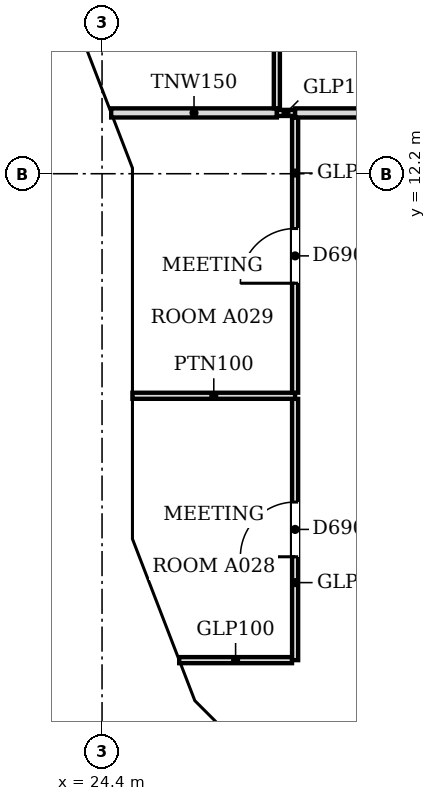
"""IFC4 building model, lengths in metres.
Left out: names, types, materials, properties, quantities, classifications, styles, units other than length and angle.
Written with IfcOpenShell. Run it as: python <this file> out.ifc"""

import sys

from ifc_helpers import new_model, si_unit, direction, frame, frame_2d, origin, place, context, subcontext, project, spatial, polyline, rectangle, outline, extrude, faceted_brep, source, transform, mapped, element, fill, save


model = new_model("IFC4")
c1 = context("Model", 3, precision=1e-05, world=origin(), true_north=direction((0.0, 1.0)))
c2 = subcontext(c1, "Body", "Model", "MODEL_VIEW")
j1 = project(units=[si_unit("LENGTHUNIT", "METRE"), si_unit("PLANEANGLEUNIT", "RADIAN")], contexts=[c1])
p1 = place(None, origin())
s1 = spatial("IfcSite", under=j1, at=p1, CompositionType="ELEMENT")
p2 = place(p1, origin())
s2 = spatial("IfcBuilding", under=s1, at=p2, CompositionType="ELEMENT")
p3 = place(p2, frame((0.0, 0.0, 95.2)))
s3 = spatial("IfcBuildingStorey", under=s2, at=p3, CompositionType="ELEMENT", Elevation=95.2)
m1 = source(origin(), c2, "Body", "Brep", [
    faceted_brep([(3.103, -0.25, 7.544), (0.053, -0.25, 3.864), (0.053, -0.25, 3.736), (3.103, -0.25, 0.056), (0.0, 0.25, 3.8), (3.149, 0.25, 7.6), (3.196, 0.25, 7.543), (3.196, 0.25, 0.057), (3.149, 0.25, 0.0), (3.149, -0.0, 0.0), (3.149, -0.0, 7.6), (0.0, 0.0, 3.8)], [[[0, 1, 2, 3]], [[4, 5, 6, 7, 8]], [[8, 7, 9]], [[6, 5, 10]], [[5, 4, 11, 1, 0, 10]], [[4, 8, 9, 3, 2, 11]], [[11, 2, 1]], [[3, 9, 7, 6, 10, 0]]]),
])
p4 = place(p3, frame((23.517, 15.185, -3.8), z_axis=(0.0, 0.0, 1.0), x_axis=(0.359864468756, -0.933004589553, 0.0)))
e1 = element("IfcWall", 1, at=p4, inside=s3, PredefinedType="SOLIDWALL", context=c2, shape_type="MappedRepresentation", body=[
    mapped(m1, transform((0.0, 0.0, 0.0), scale=1.0)),
])
m2 = source(origin(), c2, "Body", "SweptSolid", [
    extrude(outline(polyline([(2.949, 6.967), (0.325, 3.8), (2.949, 0.633), (2.949, 6.967)])), frame((0.0, 0.26, 0.0), z_axis=(0.0, -1.0, 0.0), x_axis=(1.0, 0.0, 0.0)), (0.0, 0.0, 1.0), 0.52),
])
p5 = place(p4, origin())
e2 = element("IfcOpeningElement", 2, at=p5, cuts=e1, PredefinedType="OPENING", context=c2, shape_type="MappedRepresentation", body=[
    mapped(m2, transform((0.0, 0.0, 0.0), scale=1.0)),
])
m3 = source(origin(), c2, "Body", "Brep", [
    faceted_brep([(0.093, -0.25, 0.057), (3.143, -0.25, 3.8), (0.093, -0.25, 7.543), (0.0, 0.25, 7.544), (0.047, 0.25, 7.6), (3.143, 0.25, 3.8), (0.047, 0.25, 0.0), (0.0, 0.25, 0.056), (0.047, 0.0, 0.0), (0.047, 0.0, 7.6)], [[[0, 1, 2]], [[3, 4, 5, 6, 7]], [[6, 5, 1, 0, 8]], [[5, 4, 9, 2, 1]], [[4, 3, 9]], [[7, 6, 8]], [[7, 8, 0, 2, 9, 3]]]),
])
p6 = place(p3, frame((24.65, 12.293, -3.8), z_axis=(0.0, 0.0, 1.0), x_axis=(0.0, -1.0, 0.0)))
e3 = element("IfcWall", 3, at=p6, inside=s3, PredefinedType="SOLIDWALL", context=c2, shape_type="MappedRepresentation", body=[
    mapped(m3, transform((0.0, 0.0, 0.0), scale=1.0)),
])
m4 = source(origin(), c2, "Body", "SweptSolid", [
    extrude(outline(polyline([(0.247, 0.641), (2.821, 3.8), (0.247, 6.959), (0.247, 0.641)])), frame((0.0, 0.26, 0.0), z_axis=(0.0, -1.0, 0.0), x_axis=(1.0, 0.0, 0.0)), (0.0, 0.0, 1.0), 0.52),
])
p7 = place(p6, origin())
e4 = element("IfcOpeningElement", 4, at=p7, cuts=e3, PredefinedType="OPENING", context=c2, shape_type="MappedRepresentation", body=[
    mapped(m4, transform((0.0, 0.0, 0.0), scale=1.0)),
])
m5 = source(origin(), c2, "Body", "Brep", [
    faceted_brep([(3.003, -0.25, 0.0), (3.05, -0.25, 0.06), (3.05, -0.25, 7.54), (3.003, -0.25, 7.6), (0.0, -0.25, 3.8), (0.0, 0.25, 3.8), (2.957, 0.25, 7.541), (2.957, 0.25, 0.059), (3.003, 0.0, 0.0), (3.003, 0.0, 7.6)], [[[0, 1, 2, 3, 4]], [[5, 6, 7]], [[1, 0, 8]], [[9, 3, 2]], [[6, 5, 4, 3, 9]], [[5, 7, 8, 0, 4]], [[1, 8, 7, 6, 9, 2]]]),
])
p8 = place(p3, frame((24.65, 9.15, -3.8), z_axis=(0.0, 0.0, 1.0), x_axis=(0.0, -1.0, 0.0)))
e5 = element("IfcWall", 5, at=p8, inside=s3, PredefinedType="SOLIDWALL", context=c2, shape_type="MappedRepresentation", body=[
    mapped(m5, transform((0.0, 0.0, 0.0), scale=1.0)),
])
m6 = source(origin(), c2, "Body", "SweptSolid", [
    extrude(outline(polyline([(2.803, 6.944), (0.319, 3.8), (2.803, 0.656), (2.803, 6.944)])), frame((0.0, 0.26, 0.0), z_axis=(0.0, -1.0, 0.0), x_axis=(1.0, 0.0, 0.0)), (0.0, 0.0, 1.0), 0.52),
])
p9 = place(p8, origin())
e6 = element("IfcOpeningElement", 6, at=p9, cuts=e5, PredefinedType="OPENING", context=c2, shape_type="MappedRepresentation", body=[
    mapped(m6, transform((0.0, 0.0, 0.0), scale=1.0)),
])
m7 = source(origin(), c2, "Body", "Brep", [
    faceted_brep([(0.047, -0.25, 0.0), (2.997, -0.25, 3.8), (0.047, -0.25, 7.6), (0.0, -0.25, 7.541), (0.0, -0.25, 0.059), (0.093, 0.25, 7.54), (2.944, 0.25, 3.868), (2.944, 0.25, 3.732), (0.093, 0.25, 0.06), (2.997, 0.0, 3.8), (0.047, 0.0, 0.0), (0.047, 0.0, 7.6)], [[[0, 1, 2, 3, 4]], [[5, 6, 7, 8]], [[8, 7, 9, 1, 0, 10]], [[6, 5, 11, 2, 1, 9]], [[3, 2, 11]], [[10, 0, 4]], [[8, 10, 4, 3, 11, 5]], [[9, 7, 6]]]),
])
p10 = place(p3, frame((24.633, 6.19, -3.8), z_axis=(0.0, 0.0, 1.0), x_axis=(0.359901446078, -0.932990326376, 0.0)))
e7 = element("IfcWall", 7, at=p10, inside=s3, PredefinedType="SOLIDWALL", context=c2, shape_type="MappedRepresentation", body=[
    mapped(m7, transform((0.0, 0.0, 0.0), scale=1.0)),
])
m8 = source(origin(), c2, "Body", "SweptSolid", [
    extrude(outline(polyline([(0.247, 0.665), (2.681, 3.8), (0.247, 6.935), (0.247, 0.665)])), frame((0.0, 0.26, 0.0), z_axis=(0.0, -1.0, 0.0), x_axis=(1.0, 0.0, 0.0)), (0.0, 0.0, 1.0), 0.52),
])
p11 = place(p10, origin())
e8 = element("IfcOpeningElement", 8, at=p11, cuts=e7, PredefinedType="OPENING", context=c2, shape_type="MappedRepresentation", body=[
    mapped(m8, transform((0.0, 0.0, 0.0), scale=1.0)),
])
m9 = source(origin(), c2, "Body", "Brep", [
    faceted_brep([(2.944, -0.25, 0.0), (2.997, -0.25, 0.068), (2.997, -0.25, 7.532), (2.944, -0.25, 7.6), (0.0, -0.25, 3.8), (0.053, 0.25, 3.868), (2.891, 0.25, 7.532), (2.891, 0.25, 0.068), (0.053, 0.25, 3.732), (2.944, 0.0, 0.0), (2.944, 0.0, 7.6), (0.0, 0.0, 3.8)], [[[0, 1, 2, 3, 4]], [[5, 6, 7, 8]], [[1, 0, 9]], [[10, 3, 2]], [[6, 5, 11, 4, 3, 10]], [[8, 7, 9, 0, 4, 11]], [[8, 11, 5]], [[1, 9, 7, 6, 10, 2]]]),
])
p12 = place(p3, frame((25.712, 3.394, -3.8), z_axis=(0.0, 0.0, 1.0), x_axis=(0.707066050402, -0.707147509625, 0.0)))
e9 = element("IfcWall", 9, at=p12, inside=s3, PredefinedType="SOLIDWALL", context=c2, shape_type="MappedRepresentation", body=[
    mapped(m9, transform((0.0, 0.0, 0.0), scale=1.0)),
])
m10 = source(origin(), c2, "Body", "SweptSolid", [
    extrude(outline(polyline([(2.744, 6.934), (0.316, 3.8), (2.744, 0.667), (2.744, 6.934)])), frame((0.0, 0.26, 0.0), z_axis=(0.0, -1.0, 0.0), x_axis=(1.0, 0.0, 0.0)), (0.0, 0.0, 1.0), 0.52),
])
p13 = place(p12, origin())
e10 = element("IfcOpeningElement", 10, at=p13, cuts=e9, PredefinedType="OPENING", context=c2, shape_type="MappedRepresentation", body=[
    mapped(m10, transform((0.0, 0.0, 0.0), scale=1.0)),
])
p14 = place(p2, frame((0.0, 0.0, 99.0)))
s4 = spatial("IfcBuildingStorey", under=s2, at=p14, CompositionType="ELEMENT", Elevation=99.0)
m11 = source(origin(), c2, "Body", "Brep", [
    faceted_brep([(0.106, -0.25, 0.064), (3.156, -0.25, 3.744), (3.156, -0.25, 3.856), (0.106, -0.25, 7.536), (0.0, 0.25, 7.536), (0.053, 0.25, 7.6), (3.202, 0.25, 3.8), (0.053, 0.25, 0.0), (0.0, 0.25, 0.064), (3.202, -0.0, 3.8), (0.053, 0.0, 0.0), (0.053, 0.0, 7.6)], [[[0, 1, 2, 3]], [[4, 5, 6, 7, 8]], [[7, 6, 9, 1, 0, 10]], [[6, 5, 11, 3, 2, 9]], [[5, 4, 11]], [[8, 7, 10]], [[8, 10, 0, 3, 11, 4]], [[1, 9, 2]]]),
])
p15 = place(p14, frame((23.497, 15.234, -3.8), z_axis=(0.0, 0.0, 1.0), x_axis=(0.359913782069, -0.932985567668, 0.0)))
e11 = element("IfcWall", 11, at=p15, inside=s4, PredefinedType="SOLIDWALL", context=c2, shape_type="MappedRepresentation", body=[
    mapped(m11, transform((0.0, 0.0, 0.0), scale=1.0)),
])
m12 = source(origin(), c2, "Body", "SweptSolid", [
    extrude(outline(polyline([(0.253, 0.633), (2.878, 3.8), (0.253, 6.967), (0.253, 0.633)])), frame((0.0, 0.26, 0.0), z_axis=(0.0, -1.0, 0.0), x_axis=(1.0, 0.0, 0.0)), (0.0, 0.0, 1.0), 0.52),
])
p16 = place(p15, origin())
e12 = element("IfcOpeningElement", 12, at=p16, cuts=e11, PredefinedType="OPENING", context=c2, shape_type="MappedRepresentation", body=[
    mapped(m12, transform((0.0, 0.0, 0.0), scale=1.0)),
])
m13 = source(origin(), c2, "Body", "Brep", [
    faceted_brep([(3.096, -0.25, 0.0), (6.1, -0.25, 3.8), (3.096, -0.25, 7.6), (0.047, -0.25, 3.857), (0.047, -0.25, 3.743), (0.0, 0.25, 3.8), (3.096, 0.25, 7.6), (6.053, 0.25, 3.859), (6.053, 0.25, 3.741), (3.096, 0.25, 0.0), (6.1, -0.0, 3.8), (0.0, 0.0, 3.8)], [[[0, 1, 2, 3, 4]], [[5, 6, 7, 8, 9]], [[9, 8, 10, 1, 0]], [[7, 6, 2, 1, 10]], [[6, 5, 11, 3, 2]], [[5, 9, 0, 4, 11]], [[11, 4, 3]], [[10, 8, 7]]]),
])
p17 = place(p14, frame((24.65, 12.247, -3.8), z_axis=(0.0, 0.0, 1.0), x_axis=(0.0, -1.0, 0.0)))
e13 = element("IfcWall", 13, at=p17, inside=s4, PredefinedType="SOLIDWALL", context=c2, shape_type="MappedRepresentation", body=[
    mapped(m13, transform((0.0, 0.0, 0.0), scale=1.0)),
])
m14 = source(origin(), c2, "Body", "SweptSolid", [
    extrude(outline(polyline([(3.094, 0.399), (5.781, 3.8), (3.094, 7.201), (0.323, 3.8), (3.094, 0.399)])), frame((0.0, 0.26, 0.0), z_axis=(0.0, -1.0, 0.0), x_axis=(1.0, 0.0, 0.0)), (0.0, 0.0, 1.0), 0.52),
])
p18 = place(p17, origin())
e14 = element("IfcOpeningElement", 14, at=p18, cuts=e13, PredefinedType="OPENING", context=c2, shape_type="MappedRepresentation", body=[
    mapped(m14, transform((0.0, 0.0, 0.0), scale=1.0)),
])
m15 = source(origin(), c2, "Body", "Brep", [
    faceted_brep([(2.95, -0.25, 0.0), (3.003, -0.25, 0.068), (3.003, -0.25, 7.532), (2.95, -0.25, 7.6), (0.0, -0.25, 3.8), (0.047, 0.25, 3.86), (2.898, 0.25, 7.532), (2.898, 0.25, 0.068), (0.047, 0.25, 3.74), (2.95, 0.0, 0.0), (2.95, 0.0, 7.6), (0.0, 0.0, 3.8)], [[[0, 1, 2, 3, 4]], [[5, 6, 7, 8]], [[1, 0, 9]], [[10, 3, 2]], [[6, 5, 11, 4, 3, 10]], [[8, 7, 9, 0, 4, 11]], [[8, 11, 5]], [[1, 9, 7, 6, 10, 2]]]),
])
p19 = place(p14, frame((24.65, 6.146, -3.8), z_axis=(0.0, 0.0, 1.0), x_axis=(0.359953949349, -0.932970071518, 0.0)))
e15 = element("IfcWall", 15, at=p19, inside=s4, PredefinedType="SOLIDWALL", context=c2, shape_type="MappedRepresentation", body=[
    mapped(m15, transform((0.0, 0.0, 0.0), scale=1.0)),
])
m16 = source(origin(), c2, "Body", "SweptSolid", [
    extrude(outline(polyline([(2.75, 6.935), (0.316, 3.8), (2.75, 0.665), (2.75, 6.935)])), frame((0.0, 0.26, 0.0), z_axis=(0.0, -1.0, 0.0), x_axis=(1.0, 0.0, 0.0)), (0.0, 0.0, 1.0), 0.52),
])
p20 = place(p19, origin())
e16 = element("IfcOpeningElement", 16, at=p20, cuts=e15, PredefinedType="OPENING", context=c2, shape_type="MappedRepresentation", body=[
    mapped(m16, transform((0.0, 0.0, 0.0), scale=1.0)),
])
m17 = source(origin(), c2, "Body", "Brep", [
    faceted_brep([(0.053, -0.25, 0.0), (2.997, -0.25, 3.8), (0.053, -0.25, 7.6), (0.0, -0.25, 7.532), (0.0, -0.25, 0.068), (0.106, 0.25, 7.532), (2.944, 0.25, 3.868), (2.944, 0.25, 3.732), (0.106, 0.25, 0.068), (2.997, 0.0, 3.8), (0.053, 0.0, 0.0), (0.053, 0.0, 7.6)], [[[0, 1, 2, 3, 4]], [[5, 6, 7, 8]], [[8, 7, 9, 1, 0, 10]], [[6, 5, 11, 2, 1, 9]], [[3, 2, 11]], [[10, 0, 4]], [[8, 10, 4, 3, 11, 5]], [[9, 7, 6]]]),
])
p21 = place(p14, frame((25.675, 3.431, -3.8), z_axis=(0.0, 0.0, 1.0), x_axis=(0.707106781187, -0.707106781187, 0.0)))
e17 = element("IfcWall", 17, at=p21, inside=s4, PredefinedType="SOLIDWALL", context=c2, shape_type="MappedRepresentation", body=[
    mapped(m17, transform((0.0, 0.0, 0.0), scale=1.0)),
])
m18 = source(origin(), c2, "Body", "SweptSolid", [
    extrude(outline(polyline([(0.253, 0.666), (2.681, 3.8), (0.253, 6.934), (0.253, 0.666)])), frame((0.0, 0.26, 0.0), z_axis=(0.0, -1.0, 0.0), x_axis=(1.0, 0.0, 0.0)), (0.0, 0.0, 1.0), 0.52),
])
p22 = place(p21, origin())
e18 = element("IfcOpeningElement", 18, at=p22, cuts=e17, PredefinedType="OPENING", context=c2, shape_type="MappedRepresentation", body=[
    mapped(m18, transform((0.0, 0.0, 0.0), scale=1.0)),
])
p23 = place(p3, frame((25.669, 4.2, 0.0), z_axis=(0.0, 0.0, 1.0), x_axis=(1.0, 0.0, 0.0)))
e19 = element("IfcWall", 19, at=p23, inside=s3, PredefinedType="PARTITIONING", context=c2, shape_type="SweptSolid", body=[
    extrude(rectangle(XDim=1.855, YDim=0.1, at=frame_2d((0.928, 0.0))), origin(), (0.0, 0.0, 1.0), 3.067),
])
p24 = place(p3, frame((27.575, 4.2, 0.0), z_axis=(0.0, 0.0, 1.0), x_axis=(0.0, 1.0, 0.0)))
e20 = element("IfcWall", 20, at=p24, inside=s3, PredefinedType="PARTITIONING", context=c2, shape_type="SweptSolid", body=[
    extrude(rectangle(XDim=4.297, YDim=0.1, at=frame_2d((2.148, 0.0))), origin(), (0.0, 0.0, 1.0), 3.067),
])
m19 = source(origin(), c2, "Body", "SweptSolid", [
    extrude(rectangle(XDim=0.9, YDim=2.1, at=frame_2d((0.45, 1.05))), frame((0.0, 0.06, 0.0), z_axis=(0.0, -1.0, 0.0), x_axis=(1.0, 0.0, 0.0)), (0.0, 0.0, 1.0), 0.12),
])
p25 = place(p24, frame((1.7, 0.0, 0.0)))
e21 = element("IfcOpeningElement", 21, at=p25, cuts=e20, PredefinedType="OPENING", context=c2, shape_type="MappedRepresentation", body=[
    mapped(m19, transform((0.0, 0.0, 0.0), scale=1.0)),
])
p26 = place(p3, frame((24.9, 8.548, 0.0), z_axis=(0.0, 0.0, 1.0), x_axis=(1.0, 0.0, 0.0)))
e22 = element("IfcWall", 22, at=p26, inside=s3, PredefinedType="PARTITIONING", context=c2, shape_type="SweptSolid", body=[
    extrude(rectangle(XDim=2.675, YDim=0.1, at=frame_2d((1.337, 0.0))), origin(), (0.0, 0.0, 1.0), 3.067),
])
p27 = place(p3, frame((27.575, 8.599, 0.0), z_axis=(0.0, 0.0, 1.0), x_axis=(0.0, 1.0, 0.0)))
e23 = element("IfcWall", 23, at=p27, inside=s3, PredefinedType="PARTITIONING", context=c2, shape_type="SweptSolid", body=[
    extrude(rectangle(XDim=4.525, YDim=0.1, at=frame_2d((2.263, 0.0))), origin(), (0.0, 0.0, 1.0), 3.067),
])
p28 = place(p27, frame((1.8, 0.0, 0.0)))
e24 = element("IfcOpeningElement", 24, at=p28, cuts=e23, PredefinedType="OPENING", context=c2, shape_type="MappedRepresentation", body=[
    mapped(m19, transform((0.0, 0.0, 0.0), scale=1.0)),
])
p29 = place(p3, frame((24.55, 13.2, 0.0), z_axis=(0.0, 0.0, 1.0), x_axis=(1.0, 0.0, 0.0)))
e25 = element("IfcWall", 25, at=p29, inside=s3, PredefinedType="PARTITIONING", context=c2, shape_type="SweptSolid", body=[
    extrude(rectangle(XDim=2.725, YDim=0.15, at=frame_2d((1.362, 0.0))), origin(), (0.0, 0.0, 1.0), 3.067),
])
p30 = place(p3, frame((27.276, 13.2, 0.0), z_axis=(0.0, 0.0, 1.0), x_axis=(1.0, 0.0, 0.0)))
e26 = element("IfcWall", 26, at=p30, inside=s3, PredefinedType="PARTITIONING", context=c2, shape_type="SweptSolid", body=[
    extrude(rectangle(XDim=0.298, YDim=0.1, at=frame_2d((0.149, 0.0))), origin(), (0.0, 0.0, 1.0), 3.067),
])
p31 = place(p3, frame((27.575, 13.2, 0.0), z_axis=(0.0, 0.0, 1.0), x_axis=(1.0, 0.0, 0.0)))
e27 = element("IfcWall", 27, at=p31, inside=s3, PredefinedType="PARTITIONING", context=c2, shape_type="SweptSolid", body=[
    extrude(rectangle(XDim=15.349, YDim=0.15, at=frame_2d((7.675, 0.0))), origin(), (0.0, 0.0, 1.0), 3.067),
])
p32 = place(p3, frame((27.275, 13.276, 0.0), z_axis=(0.0, 0.0, 1.0), x_axis=(0.0, 1.0, 0.0)))
e28 = element("IfcWall", 28, at=p32, inside=s3, PredefinedType="PARTITIONING", context=c2, shape_type="SweptSolid", body=[
    extrude(rectangle(XDim=5.448, YDim=0.1, at=frame_2d((2.724, 0.0))), origin(), (0.0, 0.0, 1.0), 3.067),
])
p33 = place(p32, frame((2.3, 0.0, 0.0)))
e29 = element("IfcOpeningElement", 29, at=p33, cuts=e28, PredefinedType="OPENING", context=c2, shape_type="MappedRepresentation", body=[
    mapped(m19, transform((0.0, 0.0, 0.0), scale=1.0)),
])
m20 = source(origin(), c2, "Body", "SweptSolid", [
    extrude(rectangle(XDim=0.9, YDim=2.1, at=frame_2d((0.45, 1.05))), frame((0.0, 0.025, 0.0), z_axis=(0.0, -1.0, 0.0), x_axis=(1.0, 0.0, 0.0)), (0.0, 0.0, 1.0), 0.05),
])
p34 = place(p28, origin())
e30 = element("IfcDoor", 30, at=p34, inside=s3, OperationType="SINGLE_SWING_LEFT", PredefinedType="DOOR", context=c2, shape_type="MappedRepresentation", body=[
    mapped(m20, transform((0.0, 0.0, 0.0), scale=1.0)),
])
fill(e24, e30)
p35 = place(p25, origin())
e31 = element("IfcDoor", 31, at=p35, inside=s3, OperationType="SINGLE_SWING_LEFT", PredefinedType="DOOR", context=c2, shape_type="MappedRepresentation", body=[
    mapped(m20, transform((0.0, 0.0, 0.0), scale=1.0)),
])
fill(e21, e31)
save(model, sys.argv[1])
